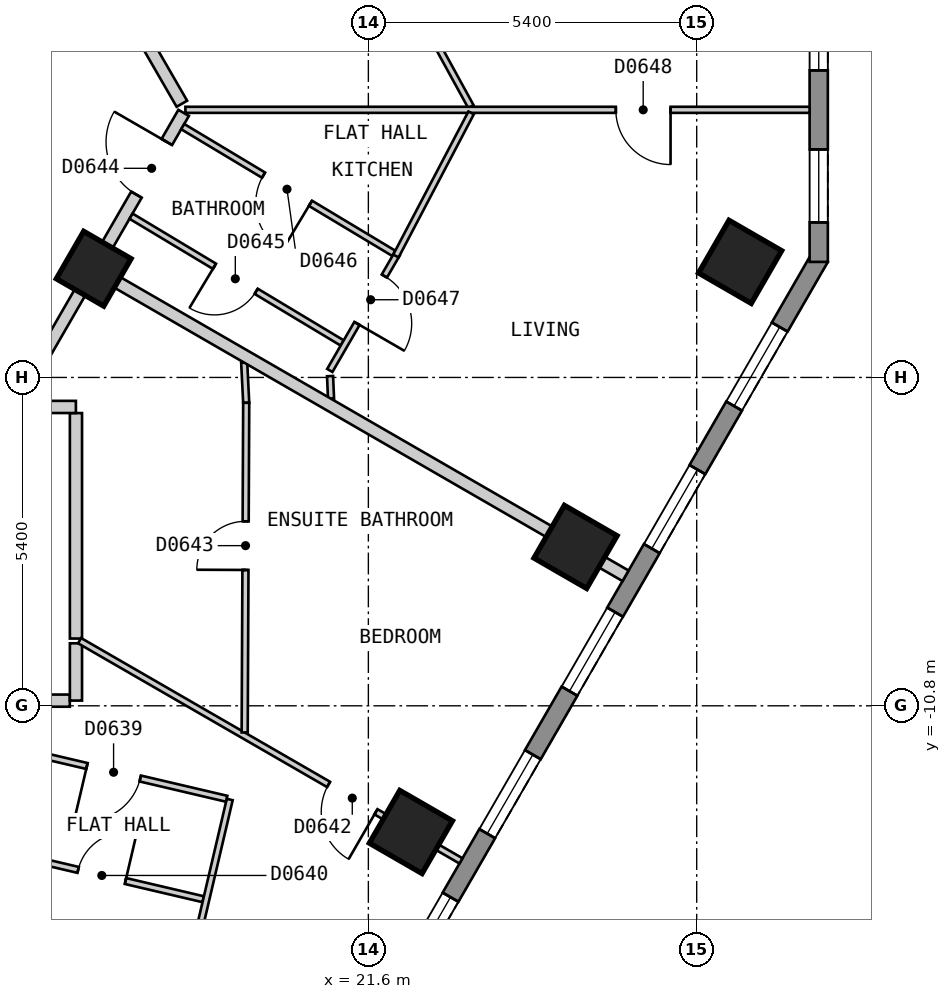
"""IFC4 building model, lengths in metres.
Left out: names, types, materials, properties, quantities, classifications, styles, units other than length and angle.
Written with IfcOpenShell. Run it as: python <this file> out.ifc"""

import sys

from ifc_helpers import new_model, si_unit, direction, frame, frame_2d, origin, origin_2d, place, context, subcontext, project, spatial, polyline, rectangle, outline, extrude, element, fill, save


model = new_model("IFC4")
c1 = context("Model", 3, precision=1e-05, world=origin(), true_north=direction((0.0, 1.0)))
c2 = subcontext(c1, "Body", "Model", "MODEL_VIEW")
j1 = project(units=[si_unit("LENGTHUNIT", "METRE"), si_unit("PLANEANGLEUNIT", "RADIAN")], contexts=[c1])
p1 = place(None, origin())
s1 = spatial("IfcSite", under=j1, at=p1, CompositionType="ELEMENT")
p2 = place(p1, origin())
s2 = spatial("IfcBuilding", under=s1, at=p2, CompositionType="ELEMENT")
p3 = place(p2, frame((0.0, 0.0, 75.0)))
s3 = spatial("IfcBuildingStorey", under=s2, at=p3, CompositionType="ELEMENT", Elevation=75.0)
for number, where, z_axis, x_axis in (
    (1, (22.3, -12.875, 0.0), (0.0, 0.0, 1.0), (0.5, 0.866, 0.0)),
    (2, (25.007, -8.187, 0.0), (0.0, 0.0, 1.0), (0.5, 0.866, 0.0)),
    (3, (27.714, -3.499, 0.0), (0.0, 0.0, 1.0), (0.5, 0.866, 0.0)),
):
    element("IfcColumn", number, at=place(p3, frame(where, z_axis=z_axis, x_axis=x_axis)), inside=s3, PredefinedType="COLUMN", context=c2, shape_type="SweptSolid", body=[
        extrude(rectangle(XDim=1.0, YDim=1.0, at=origin_2d()), origin(), (0.0, 0.0, 1.0), 3.0),
    ])
p4 = place(p3, frame((17.083, -3.612, 0.0), z_axis=(0.0, 0.0, 1.0), x_axis=(0.5, 0.866025403784, 0.0)))
e4 = element("IfcColumn", 4, at=p4, inside=s3, PredefinedType="COLUMN", context=c2, shape_type="SweptSolid", body=[
    extrude(rectangle(XDim=0.9, YDim=0.9, at=origin_2d()), origin(), (0.0, 0.0, 1.0), 3.0),
])
p5 = place(p3, frame((17.479, -23.425, 0.0), z_axis=(0.0, 0.0, 1.0), x_axis=(0.500035407905, 0.866004960056, 0.0)))
e5 = element("IfcWall", 5, at=p5, inside=s3, PredefinedType="SOLIDWALL", context=c2, shape_type="SweptSolid", body=[
    extrude(outline(polyline([(0.0, -0.15), (23.094, -0.15), (23.014, 0.15), (0.08, 0.15), (0.0, -0.15)])), origin(), (0.0, 0.0, 1.0), 2.7),
])
p6 = place(p5, frame((1.324, 0.0, 0.15)))
e6 = element("IfcOpeningElement", 6, at=p6, cuts=e5, PredefinedType="OPENING", context=c2, shape_type="SweptSolid", body=[
    extrude(rectangle(XDim=1.5, YDim=2.1, at=frame_2d((0.75, 1.05))), frame((0.0, 0.16, 0.0), z_axis=(0.0, -1.0, 0.0), x_axis=(1.0, 0.0, 0.0)), (0.0, 0.0, 1.0), 0.32),
])
p7 = place(p5, frame((4.031, 0.0, 0.15)))
e7 = element("IfcOpeningElement", 7, at=p7, cuts=e5, PredefinedType="OPENING", context=c2, shape_type="SweptSolid", body=[
    extrude(rectangle(XDim=1.5, YDim=2.1, at=frame_2d((0.75, 1.05))), frame((0.0, 0.16, 0.0), z_axis=(0.0, -1.0, 0.0), x_axis=(1.0, 0.0, 0.0)), (0.0, 0.0, 1.0), 0.32),
])
p8 = place(p5, frame((6.737, 0.0, 0.15)))
e8 = element("IfcOpeningElement", 8, at=p8, cuts=e5, PredefinedType="OPENING", context=c2, shape_type="SweptSolid", body=[
    extrude(rectangle(XDim=1.5, YDim=2.1, at=frame_2d((0.75, 1.05))), frame((0.0, 0.16, 0.0), z_axis=(0.0, -1.0, 0.0), x_axis=(1.0, 0.0, 0.0)), (0.0, 0.0, 1.0), 0.32),
])
p9 = place(p5, frame((9.444, 0.0, 0.15)))
e9 = element("IfcOpeningElement", 9, at=p9, cuts=e5, PredefinedType="OPENING", context=c2, shape_type="SweptSolid", body=[
    extrude(rectangle(XDim=1.5, YDim=2.1, at=frame_2d((0.75, 1.05))), frame((0.0, 0.16, 0.0), z_axis=(0.0, -1.0, 0.0), x_axis=(1.0, 0.0, 0.0)), (0.0, 0.0, 1.0), 0.32),
])
p10 = place(p5, frame((12.151, 0.0, 0.15)))
e10 = element("IfcOpeningElement", 10, at=p10, cuts=e5, PredefinedType="OPENING", context=c2, shape_type="SweptSolid", body=[
    extrude(rectangle(XDim=1.5, YDim=2.1, at=frame_2d((0.75, 1.05))), frame((0.0, 0.16, 0.0), z_axis=(0.0, -1.0, 0.0), x_axis=(1.0, 0.0, 0.0)), (0.0, 0.0, 1.0), 0.32),
])
p11 = place(p5, frame((14.857, 0.0, 0.15)))
e11 = element("IfcOpeningElement", 11, at=p11, cuts=e5, PredefinedType="OPENING", context=c2, shape_type="SweptSolid", body=[
    extrude(rectangle(XDim=1.5, YDim=2.1, at=frame_2d((0.75, 1.05))), frame((0.0, 0.16, 0.0), z_axis=(0.0, -1.0, 0.0), x_axis=(1.0, 0.0, 0.0)), (0.0, 0.0, 1.0), 0.32),
])
p12 = place(p5, frame((17.564, 0.0, 0.15)))
e12 = element("IfcOpeningElement", 12, at=p12, cuts=e5, PredefinedType="OPENING", context=c2, shape_type="SweptSolid", body=[
    extrude(rectangle(XDim=1.5, YDim=2.1, at=frame_2d((0.75, 1.05))), frame((0.0, 0.16, 0.0), z_axis=(0.0, -1.0, 0.0), x_axis=(1.0, 0.0, 0.0)), (0.0, 0.0, 1.0), 0.32),
])
p13 = place(p5, frame((20.271, 0.0, 0.15)))
e13 = element("IfcOpeningElement", 13, at=p13, cuts=e5, PredefinedType="OPENING", context=c2, shape_type="SweptSolid", body=[
    extrude(rectangle(XDim=1.5, YDim=2.1, at=frame_2d((0.75, 1.05))), frame((0.0, 0.16, 0.0), z_axis=(0.0, -1.0, 0.0), x_axis=(1.0, 0.0, 0.0)), (0.0, 0.0, 1.0), 0.32),
])
p14 = place(p3, frame((29.007, -3.5, 0.0), z_axis=(0.0, 0.0, 1.0), x_axis=(0.0, 1.0, 0.0)))
e14 = element("IfcWall", 14, at=p14, inside=s3, PredefinedType="SOLIDWALL", context=c2, shape_type="SweptSolid", body=[
    extrude(outline(polyline([(0.0, -0.15), (5.0, -0.15), (4.92, 0.15), (0.08, 0.15), (0.0, -0.15)])), origin(), (0.0, 0.0, 1.0), 2.7),
])
p15 = place(p14, frame((0.65, 0.0, 0.15)))
e15 = element("IfcOpeningElement", 15, at=p15, cuts=e14, PredefinedType="OPENING", context=c2, shape_type="SweptSolid", body=[
    extrude(rectangle(XDim=1.2, YDim=2.1, at=frame_2d((0.6, 1.05))), frame((0.0, 0.16, 0.0), z_axis=(0.0, -1.0, 0.0), x_axis=(1.0, 0.0, 0.0)), (0.0, 0.0, 1.0), 0.32),
])
p16 = place(p14, frame((3.15, 0.0, 0.15)))
e16 = element("IfcOpeningElement", 16, at=p16, cuts=e14, PredefinedType="OPENING", context=c2, shape_type="SweptSolid", body=[
    extrude(rectangle(XDim=1.2, YDim=2.1, at=frame_2d((0.6, 1.05))), frame((0.0, 0.16, 0.0), z_axis=(0.0, -1.0, 0.0), x_axis=(1.0, 0.0, 0.0)), (0.0, 0.0, 1.0), 0.32),
])
p17 = place(p3, frame((8.488, 16.5, 0.0), z_axis=(0.0, 0.0, 1.0), x_axis=(0.499986836607, -0.86603300354, 0.0)))
e17 = element("IfcWall", 17, at=p17, inside=s3, PredefinedType="PARTITIONING", context=c2, shape_type="SweptSolid", body=[
    extrude(rectangle(XDim=20.09, YDim=0.2, at=frame_2d((10.045, 0.0))), origin(), (0.0, 0.0, 1.0), 2.7),
])
p18 = place(p17, frame((14.569, 0.0, 0.0)))
e18 = element("IfcOpeningElement", 18, at=p18, cuts=e17, PredefinedType="OPENING", context=c2, shape_type="SweptSolid", body=[
    extrude(rectangle(XDim=1.0, YDim=2.1, at=frame_2d((0.5, 1.05))), frame((0.0, 0.11, 0.0), z_axis=(0.0, -1.0, 0.0), x_axis=(1.0, 0.0, 0.0)), (0.0, 0.0, 1.0), 0.22),
])
p19 = place(p3, frame((16.791, -5.986, 0.0), z_axis=(0.0, 0.0, 1.0), x_axis=(0.0, -1.0, 0.0)))
e19 = element("IfcWall", 19, at=p19, inside=s3, PredefinedType="PARTITIONING", context=c2, shape_type="SweptSolid", body=[
    extrude(rectangle(XDim=3.708, YDim=0.2, at=frame_2d((1.854, 0.0))), origin(), (0.0, 0.0, 1.0), 2.7),
])
p20 = place(p3, frame((15.887, -5.885, 0.0), z_axis=(0.0, 0.0, 1.0), x_axis=(1.0, 0.0, 0.0)))
e20 = element("IfcWall", 20, at=p20, inside=s3, PredefinedType="PARTITIONING", context=c2, shape_type="SweptSolid", body=[
    extrude(rectangle(XDim=0.903, YDim=0.2, at=frame_2d((0.452, 0.0))), origin(), (0.0, 0.0, 1.0), 2.7),
])
p21 = place(p3, frame((15.601, -10.715, 0.0), z_axis=(0.0, 0.0, 1.0), x_axis=(1.0, 0.0, 0.0)))
e21 = element("IfcWall", 21, at=p21, inside=s3, PredefinedType="PARTITIONING", context=c2, shape_type="SweptSolid", body=[
    extrude(rectangle(XDim=1.089, YDim=0.2, at=frame_2d((0.544, 0.0))), origin(), (0.0, 0.0, 1.0), 2.7),
])
p22 = place(p3, frame((15.771, -5.884, 0.0), z_axis=(0.0, 0.0, 1.0), x_axis=(0.499939494019, 0.866060334111, 0.0)))
e22 = element("IfcWall", 22, at=p22, inside=s3, PredefinedType="PARTITIONING", context=c2, shape_type="SweptSolid", body=[
    extrude(rectangle(XDim=5.583, YDim=0.2, at=frame_2d((2.792, 0.0))), origin(), (0.0, 0.0, 1.0), 2.7),
])
p23 = place(p22, frame((4.03, 0.0, 0.0)))
e23 = element("IfcOpeningElement", 23, at=p23, cuts=e22, PredefinedType="OPENING", context=c2, shape_type="SweptSolid", body=[
    extrude(rectangle(XDim=1.0, YDim=2.1, at=frame_2d((0.5, 1.05))), frame((0.0, 0.11, 0.0), z_axis=(0.0, -1.0, 0.0), x_axis=(1.0, 0.0, 0.0)), (0.0, 0.0, 1.0), 0.22),
])
p24 = place(p3, frame((16.791, -10.714, 0.0), z_axis=(0.0, 0.0, 1.0), x_axis=(0.0, 1.0, 0.0)))
e24 = element("IfcWall", 24, at=p24, inside=s3, PredefinedType="PARTITIONING", context=c2, shape_type="SweptSolid", body=[
    extrude(rectangle(XDim=0.942, YDim=0.2, at=frame_2d((0.471, 0.0))), origin(), (0.0, 0.0, 1.0), 2.7),
])
p25 = place(p3, frame((20.964, 3.287, 0.0), z_axis=(0.0, 0.0, 1.0), x_axis=(0.4810005962, -0.876720266936, 0.0)))
e25 = element("IfcWall", 25, at=p25, inside=s3, PredefinedType="PARTITIONING", context=c2, shape_type="SweptSolid", body=[
    extrude(rectangle(XDim=4.83, YDim=0.1, at=frame_2d((2.415, 0.0))), origin(), (0.0, 0.0, 1.0), 2.7),
])
p26 = place(p25, frame((1.995, 0.0, 0.0)))
e26 = element("IfcOpeningElement", 26, at=p26, cuts=e25, PredefinedType="OPENING", context=c2, shape_type="SweptSolid", body=[
    extrude(rectangle(XDim=0.8, YDim=2.1, at=frame_2d((0.4, 1.05))), frame((0.0, 0.06, 0.0), z_axis=(0.0, -1.0, 0.0), x_axis=(1.0, 0.0, 0.0)), (0.0, 0.0, 1.0), 0.12),
])
p27 = place(p3, frame((19.558, -5.156, 0.0), z_axis=(0.0, 0.0, 1.0), x_axis=(0.04980880462, -0.998758771167, 0.0)))
e27 = element("IfcWall", 27, at=p27, inside=s3, PredefinedType="PARTITIONING", context=c2, shape_type="SweptSolid", body=[
    extrude(rectangle(XDim=0.662, YDim=0.1, at=frame_2d((0.331, 0.0))), origin(), (0.0, 0.0, 1.0), 2.7),
])
p28 = place(p3, frame((20.97, -5.378, 0.0), z_axis=(0.0, 0.0, 1.0), x_axis=(0.043266532348, -0.999063565134, 0.0)))
e28 = element("IfcWall", 28, at=p28, inside=s3, PredefinedType="PARTITIONING", context=c2, shape_type="SweptSolid", body=[
    extrude(rectangle(XDim=0.372, YDim=0.1, at=frame_2d((0.186, 0.0))), origin(), (0.0, 0.0, 1.0), 2.7),
])
p29 = place(p3, frame((15.6, -11.468, 0.0), z_axis=(0.0, 0.0, 1.0), x_axis=(0.973560523801, -0.228429215503, 0.0)))
e29 = element("IfcWall", 29, at=p29, inside=s3, PredefinedType="PARTITIONING", context=c2, shape_type="SweptSolid", body=[
    extrude(rectangle(XDim=3.77, YDim=0.1, at=frame_2d((1.885, 0.0))), origin(), (0.0, 0.0, 1.0), 2.7),
])
p30 = place(p29, frame((1.409, 0.0, 0.0)))
e30 = element("IfcOpeningElement", 30, at=p30, cuts=e29, PredefinedType="OPENING", context=c2, shape_type="SweptSolid", body=[
    extrude(rectangle(XDim=0.9, YDim=2.1, at=frame_2d((0.45, 1.05))), frame((0.0, 0.06, 0.0), z_axis=(0.0, -1.0, 0.0), x_axis=(1.0, 0.0, 0.0)), (0.0, 0.0, 1.0), 0.12),
])
p31 = place(p3, frame((15.6, -13.211, 0.0), z_axis=(0.0, 0.0, 1.0), x_axis=(0.973593440667, -0.228288879032, 0.0)))
e31 = element("IfcWall", 31, at=p31, inside=s3, PredefinedType="PARTITIONING", context=c2, shape_type="SweptSolid", body=[
    extrude(rectangle(XDim=3.373, YDim=0.1, at=frame_2d((1.687, 0.0))), origin(), (0.0, 0.0, 1.0), 2.7),
])
p32 = place(p31, frame((1.26, 0.0, 0.0)))
e32 = element("IfcOpeningElement", 32, at=p32, cuts=e31, PredefinedType="OPENING", context=c2, shape_type="SweptSolid", body=[
    extrude(rectangle(XDim=0.8, YDim=2.1, at=frame_2d((0.4, 1.05))), frame((0.0, 0.06, 0.0), z_axis=(0.0, -1.0, 0.0), x_axis=(1.0, 0.0, 0.0)), (0.0, 0.0, 1.0), 0.12),
])
p33 = place(p3, frame((16.851, -9.729, 0.0), z_axis=(0.0, 0.0, 1.0), x_axis=(0.866027278279, -0.499996753267, 0.0)))
e33 = element("IfcWall", 33, at=p33, inside=s3, PredefinedType="PARTITIONING", context=c2, shape_type="SweptSolid", body=[
    extrude(rectangle(XDim=7.242, YDim=0.1, at=frame_2d((3.621, 0.0))), origin(), (0.0, 0.0, 1.0), 2.7),
])
p34 = place(p33, frame((4.728, 0.0, 0.0)))
e34 = element("IfcOpeningElement", 34, at=p34, cuts=e33, PredefinedType="OPENING", context=c2, shape_type="SweptSolid", body=[
    extrude(rectangle(XDim=0.9, YDim=2.1, at=frame_2d((0.45, 1.05))), frame((0.0, 0.06, 0.0), z_axis=(0.0, -1.0, 0.0), x_axis=(1.0, 0.0, 0.0)), (0.0, 0.0, 1.0), 0.12),
])
p35 = place(p3, frame((17.697, -2.748, 0.0), z_axis=(0.0, 0.0, 1.0), x_axis=(0.857359945576, -0.514717324093, 0.0)))
e35 = element("IfcWall", 35, at=p35, inside=s3, PredefinedType="PARTITIONING", context=c2, shape_type="SweptSolid", body=[
    extrude(rectangle(XDim=4.051, YDim=0.1, at=frame_2d((2.025, 0.0))), origin(), (0.0, 0.0, 1.0), 2.7),
])
p36 = place(p35, frame((1.6, 0.0, 0.0)))
e36 = element("IfcOpeningElement", 36, at=p36, cuts=e35, PredefinedType="OPENING", context=c2, shape_type="SweptSolid", body=[
    extrude(rectangle(XDim=0.8, YDim=2.1, at=frame_2d((0.4, 1.05))), frame((0.0, 0.06, 0.0), z_axis=(0.0, -1.0, 0.0), x_axis=(1.0, 0.0, 0.0)), (0.0, 0.0, 1.0), 0.12),
])
p37 = place(p3, frame((18.547, -1.275, 0.0), z_axis=(0.0, 0.0, 1.0), x_axis=(0.85733334763, -0.514761625456, 0.0)))
e37 = element("IfcWall", 37, at=p37, inside=s3, PredefinedType="PARTITIONING", context=c2, shape_type="SweptSolid", body=[
    extrude(rectangle(XDim=4.051, YDim=0.1, at=frame_2d((2.025, 0.0))), origin(), (0.0, 0.0, 1.0), 2.7),
])
p38 = place(p37, frame((1.55, 0.0, 0.0)))
e38 = element("IfcOpeningElement", 38, at=p38, cuts=e37, PredefinedType="OPENING", context=c2, shape_type="SweptSolid", body=[
    extrude(rectangle(XDim=0.9, YDim=2.1, at=frame_2d((0.45, 1.05))), frame((0.0, 0.06, 0.0), z_axis=(0.0, -1.0, 0.0), x_axis=(1.0, 0.0, 0.0)), (0.0, 0.0, 1.0), 0.12),
])
p39 = place(p3, frame((18.591, -0.999, 0.0), z_axis=(0.0, 0.0, 1.0), x_axis=(1.0, 0.0, 0.0)))
e39 = element("IfcWall", 39, at=p39, inside=s3, PredefinedType="PARTITIONING", context=c2, shape_type="SweptSolid", body=[
    extrude(rectangle(XDim=10.266, YDim=0.1, at=frame_2d((5.133, 0.0))), origin(), (0.0, 0.0, 1.0), 2.7),
])
p40 = place(p39, frame((7.079, 0.0, 0.0)))
e40 = element("IfcOpeningElement", 40, at=p40, cuts=e39, PredefinedType="OPENING", context=c2, shape_type="SweptSolid", body=[
    extrude(rectangle(XDim=0.9, YDim=2.1, at=frame_2d((0.45, 1.05))), frame((0.0, 0.06, 0.0), z_axis=(0.0, -1.0, 0.0), x_axis=(1.0, 0.0, 0.0)), (0.0, 0.0, 1.0), 0.12),
])
p41 = place(p3, frame((20.966, -5.285, 0.0), z_axis=(0.0, 0.0, 1.0), x_axis=(0.500244510215, 0.865884189716, 0.0)))
e41 = element("IfcWall", 41, at=p41, inside=s3, PredefinedType="PARTITIONING", context=c2, shape_type="SweptSolid", body=[
    extrude(rectangle(XDim=2.213, YDim=0.1, at=frame_2d((1.106, 0.0))), origin(), (0.0, 0.0, 1.0), 2.7),
])
p42 = place(p41, frame((0.893, 0.0, 0.0)))
e42 = element("IfcOpeningElement", 42, at=p42, cuts=e41, PredefinedType="OPENING", context=c2, shape_type="SweptSolid", body=[
    extrude(rectangle(XDim=0.9, YDim=2.1, at=frame_2d((0.45, 1.05))), frame((0.0, 0.06, 0.0), z_axis=(0.0, -1.0, 0.0), x_axis=(1.0, 0.0, 0.0)), (0.0, 0.0, 1.0), 0.12),
])
p43 = place(p3, frame((22.053, -3.403, 0.0), z_axis=(0.0, 0.0, 1.0), x_axis=(0.465190117005, 0.885210796952, 0.0)))
e43 = element("IfcWall", 43, at=p43, inside=s3, PredefinedType="PARTITIONING", context=c2, shape_type="SweptSolid", body=[
    extrude(rectangle(XDim=2.659, YDim=0.1, at=frame_2d((1.33, 0.0))), origin(), (0.0, 0.0, 1.0), 2.7),
])
p44 = place(p3, frame((18.481, -15.918, 0.0), z_axis=(0.0, 0.0, 1.0), x_axis=(0.228391116115, 0.97356946238, 0.0)))
e44 = element("IfcWall", 44, at=p44, inside=s3, PredefinedType="PARTITIONING", context=c2, shape_type="SweptSolid", body=[
    extrude(rectangle(XDim=3.674, YDim=0.1, at=frame_2d((1.837, 0.0))), origin(), (0.0, 0.0, 1.0), 2.7),
])
p45 = place(p3, frame((19.566, -11.238, 0.0), z_axis=(0.0, 0.0, 1.0), x_axis=(0.004638545009, 0.999989241892, 0.0)))
e45 = element("IfcWall", 45, at=p45, inside=s3, PredefinedType="PARTITIONING", context=c2, shape_type="SweptSolid", body=[
    extrude(rectangle(XDim=5.421, YDim=0.1, at=frame_2d((2.71, 0.0))), origin(), (0.0, 0.0, 1.0), 2.7),
])
p46 = place(p45, frame((2.672, 0.0, 0.0)))
e46 = element("IfcOpeningElement", 46, at=p46, cuts=e45, PredefinedType="OPENING", context=c2, shape_type="SweptSolid", body=[
    extrude(rectangle(XDim=0.8, YDim=2.1, at=frame_2d((0.4, 1.05))), frame((0.0, 0.06, 0.0), z_axis=(0.0, -1.0, 0.0), x_axis=(1.0, 0.0, 0.0)), (0.0, 0.0, 1.0), 0.12),
])
p47 = place(p3, frame((17.169, -3.662, 0.0), z_axis=(0.0, 0.0, 1.0), x_axis=(0.866047370643, -0.499961950354, 0.0)))
e47 = element("IfcWall", 47, at=p47, inside=s3, PredefinedType="PARTITIONING", context=c2, shape_type="SweptSolid", body=[
    extrude(rectangle(XDim=10.001, YDim=0.2, at=frame_2d((5.0, 0.0))), origin(), (0.0, 0.0, 1.0), 2.7),
])
p48 = place(p9, origin())
e48 = element("IfcWindow", 48, at=p48, inside=s3, PartitioningType="SINGLE_PANEL", PredefinedType="WINDOW", context=c2, shape_type="SweptSolid", body=[
    extrude(rectangle(XDim=1.5, YDim=2.1, at=frame_2d((0.75, 1.05))), frame((0.0, 0.03, 0.0), z_axis=(0.0, -1.0, 0.0), x_axis=(1.0, 0.0, 0.0)), (0.0, 0.0, 1.0), 0.06),
])
fill(e9, e48)
p49 = place(p10, origin())
e49 = element("IfcWindow", 49, at=p49, inside=s3, PartitioningType="SINGLE_PANEL", PredefinedType="WINDOW", context=c2, shape_type="SweptSolid", body=[
    extrude(rectangle(XDim=1.5, YDim=2.1, at=frame_2d((0.75, 1.05))), frame((0.0, 0.03, 0.0), z_axis=(0.0, -1.0, 0.0), x_axis=(1.0, 0.0, 0.0)), (0.0, 0.0, 1.0), 0.06),
])
fill(e10, e49)
p50 = place(p11, origin())
e50 = element("IfcWindow", 50, at=p50, inside=s3, PartitioningType="SINGLE_PANEL", PredefinedType="WINDOW", context=c2, shape_type="SweptSolid", body=[
    extrude(rectangle(XDim=1.5, YDim=2.1, at=frame_2d((0.75, 1.05))), frame((0.0, 0.03, 0.0), z_axis=(0.0, -1.0, 0.0), x_axis=(1.0, 0.0, 0.0)), (0.0, 0.0, 1.0), 0.06),
])
fill(e11, e50)
p51 = place(p12, origin())
e51 = element("IfcWindow", 51, at=p51, inside=s3, PartitioningType="SINGLE_PANEL", PredefinedType="WINDOW", context=c2, shape_type="SweptSolid", body=[
    extrude(rectangle(XDim=1.5, YDim=2.1, at=frame_2d((0.75, 1.05))), frame((0.0, 0.03, 0.0), z_axis=(0.0, -1.0, 0.0), x_axis=(1.0, 0.0, 0.0)), (0.0, 0.0, 1.0), 0.06),
])
fill(e12, e51)
p52 = place(p13, origin())
e52 = element("IfcWindow", 52, at=p52, inside=s3, PartitioningType="SINGLE_PANEL", PredefinedType="WINDOW", context=c2, shape_type="SweptSolid", body=[
    extrude(rectangle(XDim=1.5, YDim=2.1, at=frame_2d((0.75, 1.05))), frame((0.0, 0.03, 0.0), z_axis=(0.0, -1.0, 0.0), x_axis=(1.0, 0.0, 0.0)), (0.0, 0.0, 1.0), 0.06),
])
fill(e13, e52)
p53 = place(p15, origin())
e53 = element("IfcWindow", 53, at=p53, inside=s3, PartitioningType="SINGLE_PANEL", PredefinedType="WINDOW", context=c2, shape_type="SweptSolid", body=[
    extrude(rectangle(XDim=1.2, YDim=2.1, at=frame_2d((0.6, 1.05))), frame((0.0, 0.03, 0.0), z_axis=(0.0, -1.0, 0.0), x_axis=(1.0, 0.0, 0.0)), (0.0, 0.0, 1.0), 0.06),
])
fill(e15, e53)
p54 = place(p16, origin())
e54 = element("IfcWindow", 54, at=p54, inside=s3, PartitioningType="SINGLE_PANEL", PredefinedType="WINDOW", context=c2, shape_type="SweptSolid", body=[
    extrude(rectangle(XDim=1.2, YDim=2.1, at=frame_2d((0.6, 1.05))), frame((0.0, 0.03, 0.0), z_axis=(0.0, -1.0, 0.0), x_axis=(1.0, 0.0, 0.0)), (0.0, 0.0, 1.0), 0.06),
])
fill(e16, e54)
p55 = place(p30, origin())
e55 = element("IfcDoor", 55, at=p55, inside=s3, OperationType="SINGLE_SWING_LEFT", PredefinedType="DOOR", context=c2, shape_type="SweptSolid", body=[
    extrude(rectangle(XDim=0.9, YDim=2.1, at=frame_2d((0.45, 1.05))), frame((0.0, 0.025, 0.0), z_axis=(0.0, -1.0, 0.0), x_axis=(1.0, 0.0, 0.0)), (0.0, 0.0, 1.0), 0.05),
])
fill(e30, e55)
p56 = place(p32, origin())
e56 = element("IfcDoor", 56, at=p56, inside=s3, OperationType="SINGLE_SWING_RIGHT", PredefinedType="DOOR", context=c2, shape_type="SweptSolid", body=[
    extrude(rectangle(XDim=0.8, YDim=2.1, at=frame_2d((0.4, 1.05))), frame((0.0, 0.025, 0.0), z_axis=(0.0, -1.0, 0.0), x_axis=(1.0, 0.0, 0.0)), (0.0, 0.0, 1.0), 0.05),
])
fill(e32, e56)
p57 = place(p34, origin())
e57 = element("IfcDoor", 57, at=p57, inside=s3, OperationType="SINGLE_SWING_RIGHT", PredefinedType="DOOR", context=c2, shape_type="SweptSolid", body=[
    extrude(rectangle(XDim=0.9, YDim=2.1, at=frame_2d((0.45, 1.05))), frame((0.0, 0.025, 0.0), z_axis=(0.0, -1.0, 0.0), x_axis=(1.0, 0.0, 0.0)), (0.0, 0.0, 1.0), 0.05),
])
fill(e34, e57)
p58 = place(p46, origin())
e58 = element("IfcDoor", 58, at=p58, inside=s3, OperationType="SINGLE_SWING_LEFT", PredefinedType="DOOR", context=c2, shape_type="SweptSolid", body=[
    extrude(rectangle(XDim=0.8, YDim=2.1, at=frame_2d((0.4, 1.05))), frame((0.0, 0.025, 0.0), z_axis=(0.0, -1.0, 0.0), x_axis=(1.0, 0.0, 0.0)), (0.0, 0.0, 1.0), 0.05),
])
fill(e46, e58)
p59 = place(p23, origin())
e59 = element("IfcDoor", 59, at=p59, inside=s3, OperationType="SINGLE_SWING_RIGHT", PredefinedType="DOOR", context=c2, shape_type="SweptSolid", body=[
    extrude(rectangle(XDim=1.0, YDim=2.1, at=frame_2d((0.5, 1.05))), frame((0.0, 0.025, 0.0), z_axis=(0.0, -1.0, 0.0), x_axis=(1.0, 0.0, 0.0)), (0.0, 0.0, 1.0), 0.05),
])
fill(e23, e59)
p60 = place(p36, origin())
e60 = element("IfcDoor", 60, at=p60, inside=s3, OperationType="SINGLE_SWING_LEFT", PredefinedType="DOOR", context=c2, shape_type="SweptSolid", body=[
    extrude(rectangle(XDim=0.8, YDim=2.1, at=frame_2d((0.4, 1.05))), frame((0.0, 0.025, 0.0), z_axis=(0.0, -1.0, 0.0), x_axis=(1.0, 0.0, 0.0)), (0.0, 0.0, 1.0), 0.05),
])
fill(e36, e60)
p61 = place(p38, origin())
e61 = element("IfcDoor", 61, at=p61, inside=s3, OperationType="SINGLE_SWING_RIGHT", PredefinedType="DOOR", context=c2, shape_type="SweptSolid", body=[
    extrude(rectangle(XDim=0.9, YDim=2.1, at=frame_2d((0.45, 1.05))), frame((0.0, 0.025, 0.0), z_axis=(0.0, -1.0, 0.0), x_axis=(1.0, 0.0, 0.0)), (0.0, 0.0, 1.0), 0.05),
])
fill(e38, e61)
p62 = place(p42, origin())
e62 = element("IfcDoor", 62, at=p62, inside=s3, OperationType="SINGLE_SWING_LEFT", PredefinedType="DOOR", context=c2, shape_type="SweptSolid", body=[
    extrude(rectangle(XDim=0.9, YDim=2.1, at=frame_2d((0.45, 1.05))), frame((0.0, 0.025, 0.0), z_axis=(0.0, -1.0, 0.0), x_axis=(1.0, 0.0, 0.0)), (0.0, 0.0, 1.0), 0.05),
])
fill(e42, e62)
p63 = place(p40, origin())
e63 = element("IfcDoor", 63, at=p63, inside=s3, OperationType="SINGLE_SWING_RIGHT", PredefinedType="DOOR", context=c2, shape_type="SweptSolid", body=[
    extrude(rectangle(XDim=0.9, YDim=2.1, at=frame_2d((0.45, 1.05))), frame((0.0, 0.025, 0.0), z_axis=(0.0, -1.0, 0.0), x_axis=(1.0, 0.0, 0.0)), (0.0, 0.0, 1.0), 0.05),
])
fill(e40, e63)
save(model, sys.argv[1])
